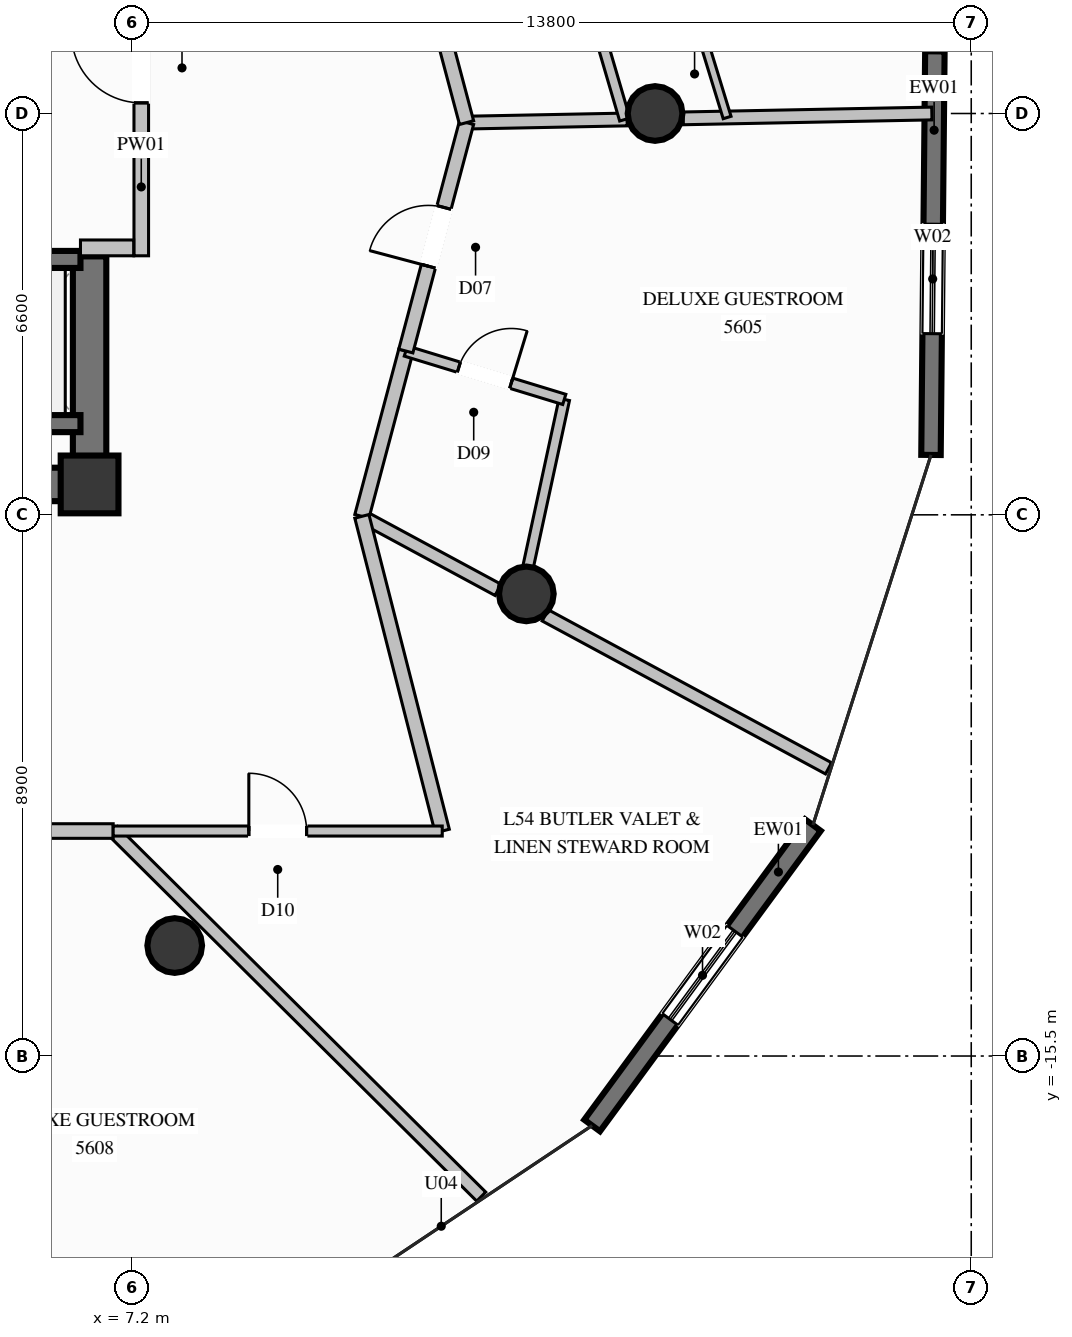
"""IFC4 building model, lengths in metres.
Left out: names, types, materials, properties, quantities, classifications, styles, units other than length and angle.
Written with IfcOpenShell. Run it as: python <this file> out.ifc"""

import sys

from ifc_helpers import new_model, si_unit, direction, frame, frame_2d, origin, origin_2d, place, context, subcontext, project, spatial, rectangle, circle, extrude, element, fill, save


model = new_model("IFC4")
c1 = context("Model", 3, precision=1e-05, world=origin(), true_north=direction((0.0, 1.0)))
c2 = subcontext(c1, "Body", "Model", "MODEL_VIEW")
j1 = project(units=[si_unit("LENGTHUNIT", "METRE"), si_unit("PLANEANGLEUNIT", "RADIAN")], contexts=[c1])
p1 = place(None, origin())
s1 = spatial("IfcSite", under=j1, at=p1, CompositionType="ELEMENT")
p2 = place(p1, origin())
s2 = spatial("IfcBuilding", under=s1, at=p2, CompositionType="ELEMENT")
p3 = place(p2, frame((0.0, 0.0, 209.2)))
s3 = spatial("IfcBuildingStorey", under=s2, at=p3, CompositionType="ELEMENT", Elevation=209.2)
p4 = place(p3, frame((6.5, -6.1, 0.0), z_axis=(0.0, 0.0, 1.0), x_axis=(1.0, 0.0, 0.0)))
e1 = element("IfcColumn", 1, at=p4, inside=s3, PredefinedType="COLUMN", context=c2, shape_type="SweptSolid", body=[
    extrude(rectangle(XDim=0.95, YDim=0.95, at=origin_2d()), origin(), (0.0, 0.0, 1.0), 3.6),
])
p5 = place(p3, frame((4.15, -6.1, 0.0), z_axis=(0.0, 0.0, 1.0), x_axis=(1.0, 0.0, 0.0)))
e2 = element("IfcWall", 2, at=p5, inside=s3, PredefinedType="SHEAR", context=c2, shape_type="SweptSolid", body=[
    extrude(rectangle(XDim=2.075, YDim=0.55, at=frame_2d((1.038, 0.0))), origin(), (0.0, 0.0, 1.0), 3.6),
])
p6 = place(p3, frame((6.5, -6.375, 0.0), z_axis=(0.0, 0.0, 1.0), x_axis=(0.0, 1.0, 0.0)))
e3 = element("IfcWall", 3, at=p6, inside=s3, PredefinedType="SHEAR", context=c2, shape_type="SweptSolid", body=[
    extrude(rectangle(XDim=4.025, YDim=0.55, at=frame_2d((2.012, 0.0))), origin(), (0.0, 0.0, 1.0), 3.6),
])
for number, where, z_axis, x_axis in (
    (4, (15.8, 0.0, 0.0), (0.0, 0.0, 1.0), (1.0, 0.0, 0.0)),
    (5, (7.9, -13.683, 0.0), (0.0, 0.0, 1.0), (1.0, 0.0, 0.0)),
    (6, (13.683, -7.9, 0.0), (0.0, 0.0, 1.0), (1.0, 0.0, 0.0)),
):
    element("IfcColumn", number, at=place(p3, frame(where, z_axis=z_axis, x_axis=x_axis)), inside=s3, PredefinedType="COLUMN", context=c2, shape_type="SweptSolid", body=[
        extrude(circle(Radius=0.45, at=origin_2d()), origin(), (0.0, 0.0, 1.0), 3.6),
    ])
p7 = place(p3, frame((18.396, -11.702, 0.0), z_axis=(0.0, 0.0, 1.0), x_axis=(-0.592167723458, -0.805814735094, 0.0)))
e7 = element("IfcWall", 7, at=p7, inside=s3, PredefinedType="SOLIDWALL", context=c2, shape_type="SweptSolid", body=[
    extrude(rectangle(XDim=6.132, YDim=0.32, at=frame_2d((3.066, 0.0))), origin(), (0.0, 0.0, 1.0), 3.36),
])
p8 = place(p7, frame((2.166, 0.0, 0.35)))
e8 = element("IfcOpeningElement", 8, at=p8, cuts=e7, PredefinedType="OPENING", context=c2, shape_type="SweptSolid", body=[
    extrude(rectangle(XDim=1.8, YDim=2.6, at=frame_2d((0.9, 1.3))), frame((0.0, 0.17, 0.0), z_axis=(0.0, -1.0, 0.0), x_axis=(1.0, 0.0, 0.0)), (0.0, 0.0, 1.0), 0.34),
])
p9 = place(p3, frame((20.402, 1.022, 0.0), z_axis=(0.0, 0.0, 1.0), x_axis=(-0.009674000115, -0.999953205766, 0.0)))
e9 = element("IfcWall", 9, at=p9, inside=s3, PredefinedType="SOLIDWALL", context=c2, shape_type="SweptSolid", body=[
    extrude(rectangle(XDim=6.637, YDim=0.32, at=frame_2d((3.319, 0.0))), origin(), (0.0, 0.0, 1.0), 3.36),
])
p10 = place(p9, frame((2.843, 0.0, 0.35)))
e10 = element("IfcOpeningElement", 10, at=p10, cuts=e9, PredefinedType="OPENING", context=c2, shape_type="SweptSolid", body=[
    extrude(rectangle(XDim=1.8, YDim=2.6, at=frame_2d((0.9, 1.3))), frame((0.0, 0.17, 0.0), z_axis=(0.0, -1.0, 0.0), x_axis=(1.0, 0.0, 0.0)), (0.0, 0.0, 1.0), 0.34),
])
p11 = place(p3, frame((4.15, -5.1, 0.0), z_axis=(0.0, 0.0, 1.0), x_axis=(1.0, 0.0, 0.0)))
e11 = element("IfcWall", 11, at=p11, inside=s3, PredefinedType="SOLIDWALL", context=c2, shape_type="SweptSolid", body=[
    extrude(rectangle(XDim=2.2, YDim=0.28, at=frame_2d((1.1, 0.0))), origin(), (0.0, 0.0, 1.0), 3.36),
])
p12 = place(p3, frame((6.35, -2.4, 0.0), z_axis=(0.0, 0.0, 1.0), x_axis=(-1.0, 0.0, 0.0)))
e12 = element("IfcWall", 12, at=p12, inside=s3, PredefinedType="SOLIDWALL", context=c2, shape_type="SweptSolid", body=[
    extrude(rectangle(XDim=2.2, YDim=0.28, at=frame_2d((1.1, 0.0))), origin(), (0.0, 0.0, 1.0), 3.36),
])
p13 = place(p12, frame((0.5, 0.0, 0.0)))
e13 = element("IfcOpeningElement", 13, at=p13, cuts=e12, PredefinedType="OPENING", context=c2, shape_type="SweptSolid", body=[
    extrude(rectangle(XDim=1.2, YDim=2.2, at=frame_2d((0.6, 1.1))), frame((0.0, 0.15, 0.0), z_axis=(0.0, -1.0, 0.0), x_axis=(1.0, 0.0, 0.0)), (0.0, 0.0, 1.0), 0.3),
])
p14 = place(p3, frame((7.35, -2.34, 0.0), z_axis=(0.0, 0.0, 1.0), x_axis=(0.0, 1.0, 0.0)))
e14 = element("IfcWall", 14, at=p14, inside=s3, PredefinedType="PARTITIONING", context=c2, shape_type="SweptSolid", body=[
    extrude(rectangle(XDim=5.02, YDim=0.24, at=frame_2d((2.51, 0.0))), origin(), (0.0, 0.0, 1.0), 2.445),
])
p15 = place(p14, frame((2.515, 0.0, 0.0)))
e15 = element("IfcOpeningElement", 15, at=p15, cuts=e14, PredefinedType="OPENING", context=c2, shape_type="SweptSolid", body=[
    extrude(rectangle(XDim=1.15, YDim=2.2, at=frame_2d((0.575, 1.1))), frame((0.0, 0.13, 0.0), z_axis=(0.0, -1.0, 0.0), x_axis=(1.0, 0.0, 0.0)), (0.0, 0.0, 1.0), 0.26),
])
p16 = place(p3, frame((6.35, -2.21, 0.0), z_axis=(0.0, 0.0, 1.0), x_axis=(1.0, 0.0, 0.0)))
e16 = element("IfcWall", 16, at=p16, inside=s3, PredefinedType="PARTITIONING", context=c2, shape_type="SweptSolid", body=[
    extrude(rectangle(XDim=0.875, YDim=0.26, at=frame_2d((0.438, 0.0))), origin(), (0.0, 0.0, 1.0), 3.36),
])
p17 = place(p3, frame((12.7, -0.15, 0.0), z_axis=(0.0, 0.0, 1.0), x_axis=(0.999806076636, 0.019692869828, 0.0)))
e17 = element("IfcWall", 17, at=p17, inside=s3, PredefinedType="PARTITIONING", context=c2, shape_type="SweptSolid", body=[
    extrude(rectangle(XDim=2.641, YDim=0.21, at=frame_2d((1.32, 0.0))), origin(), (0.0, 0.0, 1.0), 3.36),
])
p18 = place(p3, frame((16.263, -0.08, 0.0), z_axis=(0.0, 0.0, 1.0), x_axis=(0.999808303125, 0.019579504653, 0.0)))
e18 = element("IfcWall", 18, at=p18, inside=s3, PredefinedType="PARTITIONING", context=c2, shape_type="SweptSolid", body=[
    extrude(rectangle(XDim=4.09, YDim=0.21, at=frame_2d((2.045, 0.0))), origin(), (0.0, 0.0, 1.0), 3.36),
])
p19 = place(p3, frame((10.978, -6.625, 0.0), z_axis=(0.0, 0.0, 1.0), x_axis=(0.88000562824, -0.4749632557, 0.0)))
e19 = element("IfcWall", 19, at=p19, inside=s3, PredefinedType="PARTITIONING", context=c2, shape_type="SweptSolid", body=[
    extrude(rectangle(XDim=2.545, YDim=0.21, at=frame_2d((1.273, 0.0))), origin(), (0.0, 0.0, 1.0), 2.801),
])
p20 = place(p3, frame((13.993, -8.253, 0.0), z_axis=(0.0, 0.0, 1.0), x_axis=(0.879934691378, -0.475094663104, 0.0)))
e20 = element("IfcWall", 20, at=p20, inside=s3, PredefinedType="PARTITIONING", context=c2, shape_type="SweptSolid", body=[
    extrude(rectangle(XDim=5.296, YDim=0.21, at=frame_2d((2.648, 0.0))), origin(), (0.0, 0.0, 1.0), 3.36),
])
p21 = place(p3, frame((10.978, -6.625, 0.0), z_axis=(0.0, 0.0, 1.0), x_axis=(0.256944245483, 0.966426228283, 0.0)))
e21 = element("IfcWall", 21, at=p21, inside=s3, PredefinedType="PARTITIONING", context=c2, shape_type="SweptSolid", body=[
    extrude(rectangle(XDim=2.813, YDim=0.24, at=frame_2d((1.407, 0.0))), origin(), (0.0, 0.0, 1.0), 3.36),
])
p22 = place(p3, frame((13.587, -8.034, 0.0), z_axis=(0.0, 0.0, 1.0), x_axis=(0.211201499273, 0.97744254394, 0.0)))
e22 = element("IfcWall", 22, at=p22, inside=s3, PredefinedType="PLUMBINGWALL", context=c2, shape_type="SweptSolid", body=[
    extrude(rectangle(XDim=3.409, YDim=0.175, at=frame_2d((1.705, 0.0))), origin(), (0.0, 0.0, 1.0), 2.929),
])
p23 = place(p3, frame((11.701, -3.906, 0.0), z_axis=(0.0, 0.0, 1.0), x_axis=(0.956389123017, -0.29209560999, 0.0)))
e23 = element("IfcWall", 23, at=p23, inside=s3, PredefinedType="PLUMBINGWALL", context=c2, shape_type="SweptSolid", body=[
    extrude(rectangle(XDim=2.725, YDim=0.175, at=frame_2d((1.362, 0.0))), origin(), (0.0, 0.0, 1.0), 3.36),
])
p24 = place(p23, frame((0.912, 0.0, 0.0)))
e24 = element("IfcOpeningElement", 24, at=p24, cuts=e23, PredefinedType="OPENING", context=c2, shape_type="SweptSolid", body=[
    extrude(rectangle(XDim=0.9, YDim=2.1, at=frame_2d((0.45, 1.05))), frame((0.0, 0.098, 0.0), z_axis=(0.0, -1.0, 0.0), x_axis=(1.0, 0.0, 0.0)), (0.0, 0.0, 1.0), 0.195),
])
p25 = place(p3, frame((11.701, -3.906, 0.0), z_axis=(0.0, 0.0, 1.0), x_axis=(0.257037057674, 0.966401547486, 0.0)))
e25 = element("IfcWall", 25, at=p25, inside=s3, PredefinedType="PARTITIONING", context=c2, shape_type="SweptSolid", body=[
    extrude(rectangle(XDim=3.887, YDim=0.24, at=frame_2d((1.943, 0.0))), origin(), (0.0, 0.0, 1.0), 3.36),
])
p26 = place(p25, frame((1.443, 0.0, 0.0)))
e26 = element("IfcOpeningElement", 26, at=p26, cuts=e25, PredefinedType="OPENING", context=c2, shape_type="SweptSolid", body=[
    extrude(rectangle(XDim=1.0, YDim=2.2, at=frame_2d((0.5, 1.1))), frame((0.0, 0.13, 0.0), z_axis=(0.0, -1.0, 0.0), x_axis=(1.0, 0.0, 0.0)), (0.0, 0.0, 1.0), 0.26),
])
p27 = place(p3, frame((12.7, -0.15, 0.0), z_axis=(0.0, 0.0, 1.0), x_axis=(-0.256858081143, 0.966449132729, 0.0)))
e27 = element("IfcWall", 27, at=p27, inside=s3, PredefinedType="PARTITIONING", context=c2, shape_type="SweptSolid", body=[
    extrude(rectangle(XDim=2.814, YDim=0.24, at=frame_2d((1.407, 0.0))), origin(), (0.0, 0.0, 1.0), 3.36),
])
p28 = place(p3, frame((15.302, -0.099, 0.0), z_axis=(0.0, 0.0, 1.0), x_axis=(-0.280987384428, 0.959711461739, 0.0)))
e28 = element("IfcWall", 28, at=p28, inside=s3, PredefinedType="PLUMBINGWALL", context=c2, shape_type="SweptSolid", body=[
    extrude(rectangle(XDim=3.342, YDim=0.175, at=frame_2d((1.671, 0.0))), origin(), (0.0, 0.0, 1.0), 2.929),
])
p29 = place(p3, frame((16.985, -0.066, 0.0), z_axis=(0.0, 0.0, 1.0), x_axis=(-0.292776617633, 0.956180867915, 0.0)))
e29 = element("IfcWall", 29, at=p29, inside=s3, PredefinedType="PARTITIONING", context=c2, shape_type="SweptSolid", body=[
    extrude(rectangle(XDim=8.768, YDim=0.135, at=frame_2d((4.384, 0.0))), origin(), (0.0, 0.0, 1.0), 3.36),
])
p30 = place(p29, frame((3.909, 0.0, 0.0)))
e30 = element("IfcOpeningElement", 30, at=p30, cuts=e29, PredefinedType="OPENING", context=c2, shape_type="SweptSolid", body=[
    extrude(rectangle(XDim=0.95, YDim=2.1, at=frame_2d((0.475, 1.05))), frame((0.0, 0.078, 0.0), z_axis=(0.0, -1.0, 0.0), x_axis=(1.0, 0.0, 0.0)), (0.0, 0.0, 1.0), 0.155),
])
p31 = place(p3, frame((6.888, -11.8, 0.0), z_axis=(0.0, 0.0, 1.0), x_axis=(0.709506540997, -0.704698849355, 0.0)))
e31 = element("IfcWall", 31, at=p31, inside=s3, PredefinedType="PARTITIONING", context=c2, shape_type="SweptSolid", body=[
    extrude(rectangle(XDim=8.531, YDim=0.21, at=frame_2d((4.266, 0.0))), origin(), (0.0, 0.0, 1.0), 3.36),
])
p32 = place(p3, frame((3.031, -11.8, 0.0), z_axis=(0.0, 0.0, 1.0), x_axis=(1.0, 0.0, 0.0)))
e32 = element("IfcWall", 32, at=p32, inside=s3, PredefinedType="PARTITIONING", context=c2, shape_type="SweptSolid", body=[
    extrude(rectangle(XDim=3.857, YDim=0.24, at=frame_2d((1.928, 0.0))), origin(), (0.0, 0.0, 1.0), 3.36),
])
p33 = place(p32, frame((1.428, 0.0, 0.0)))
e33 = element("IfcOpeningElement", 33, at=p33, cuts=e32, PredefinedType="OPENING", context=c2, shape_type="SweptSolid", body=[
    extrude(rectangle(XDim=1.0, YDim=2.2, at=frame_2d((0.5, 1.1))), frame((0.0, 0.13, 0.0), z_axis=(0.0, -1.0, 0.0), x_axis=(1.0, 0.0, 0.0)), (0.0, 0.0, 1.0), 0.26),
])
p34 = place(p3, frame((12.3, -11.8, 0.0), z_axis=(0.0, 0.0, 1.0), x_axis=(-0.247511976945, 0.968884833852, 0.0)))
e34 = element("IfcWall", 34, at=p34, inside=s3, PredefinedType="PARTITIONING", context=c2, shape_type="SweptSolid", body=[
    extrude(rectangle(XDim=5.341, YDim=0.24, at=frame_2d((2.671, 0.0))), origin(), (0.0, 0.0, 1.0), 3.36),
])
p35 = place(p3, frame((6.888, -11.8, 0.0), z_axis=(0.0, 0.0, 1.0), x_axis=(1.0, 0.0, 0.0)))
e35 = element("IfcWall", 35, at=p35, inside=s3, PredefinedType="PARTITIONING", context=c2, shape_type="SweptSolid", body=[
    extrude(rectangle(XDim=5.412, YDim=0.165, at=frame_2d((2.706, 0.0))), origin(), (0.0, 0.0, 1.0), 3.36),
])
p36 = place(p35, frame((2.231, 0.0, 0.0)))
e36 = element("IfcOpeningElement", 36, at=p36, cuts=e35, PredefinedType="OPENING", context=c2, shape_type="SweptSolid", body=[
    extrude(rectangle(XDim=0.95, YDim=2.1, at=frame_2d((0.475, 1.05))), frame((0.0, 0.093, 0.0), z_axis=(0.0, -1.0, 0.0), x_axis=(1.0, 0.0, 0.0)), (0.0, 0.0, 1.0), 0.185),
])
p37 = place(p8, origin())
e37 = element("IfcWindow", 37, at=p37, inside=s3, PartitioningType="SINGLE_PANEL", PredefinedType="WINDOW", context=c2, shape_type="SweptSolid", body=[
    extrude(rectangle(XDim=1.8, YDim=2.6, at=frame_2d((0.9, 1.3))), frame((0.0, 0.03, 0.0), z_axis=(0.0, -1.0, 0.0), x_axis=(1.0, 0.0, 0.0)), (0.0, 0.0, 1.0), 0.06),
])
fill(e8, e37)
p38 = place(p10, origin())
e38 = element("IfcWindow", 38, at=p38, inside=s3, PartitioningType="SINGLE_PANEL", PredefinedType="WINDOW", context=c2, shape_type="SweptSolid", body=[
    extrude(rectangle(XDim=1.8, YDim=2.6, at=frame_2d((0.9, 1.3))), frame((0.0, 0.03, 0.0), z_axis=(0.0, -1.0, 0.0), x_axis=(1.0, 0.0, 0.0)), (0.0, 0.0, 1.0), 0.06),
])
fill(e10, e38)
p39 = place(p15, origin())
e39 = element("IfcDoor", 39, at=p39, inside=s3, OperationType="SINGLE_SWING_RIGHT", PredefinedType="DOOR", context=c2, shape_type="SweptSolid", body=[
    extrude(rectangle(XDim=1.15, YDim=2.2, at=frame_2d((0.575, 1.1))), frame((0.0, 0.025, 0.0), z_axis=(0.0, -1.0, 0.0), x_axis=(1.0, 0.0, 0.0)), (0.0, 0.0, 1.0), 0.05),
])
fill(e15, e39)
p40 = place(p24, origin())
e40 = element("IfcDoor", 40, at=p40, inside=s3, OperationType="SINGLE_SWING_RIGHT", PredefinedType="DOOR", context=c2, shape_type="SweptSolid", body=[
    extrude(rectangle(XDim=0.9, YDim=2.1, at=frame_2d((0.45, 1.05))), frame((0.0, 0.025, 0.0), z_axis=(0.0, -1.0, 0.0), x_axis=(1.0, 0.0, 0.0)), (0.0, 0.0, 1.0), 0.05),
])
fill(e24, e40)
p41 = place(p26, origin())
e41 = element("IfcDoor", 41, at=p41, inside=s3, OperationType="SINGLE_SWING_LEFT", PredefinedType="DOOR", context=c2, shape_type="SweptSolid", body=[
    extrude(rectangle(XDim=1.0, YDim=2.2, at=frame_2d((0.5, 1.1))), frame((0.0, 0.025, 0.0), z_axis=(0.0, -1.0, 0.0), x_axis=(1.0, 0.0, 0.0)), (0.0, 0.0, 1.0), 0.05),
])
fill(e26, e41)
p42 = place(p36, origin())
e42 = element("IfcDoor", 42, at=p42, inside=s3, OperationType="SINGLE_SWING_LEFT", PredefinedType="DOOR", context=c2, shape_type="SweptSolid", body=[
    extrude(rectangle(XDim=0.95, YDim=2.1, at=frame_2d((0.475, 1.05))), frame((0.0, 0.025, 0.0), z_axis=(0.0, -1.0, 0.0), x_axis=(1.0, 0.0, 0.0)), (0.0, 0.0, 1.0), 0.05),
])
fill(e36, e42)
save(model, sys.argv[1])
